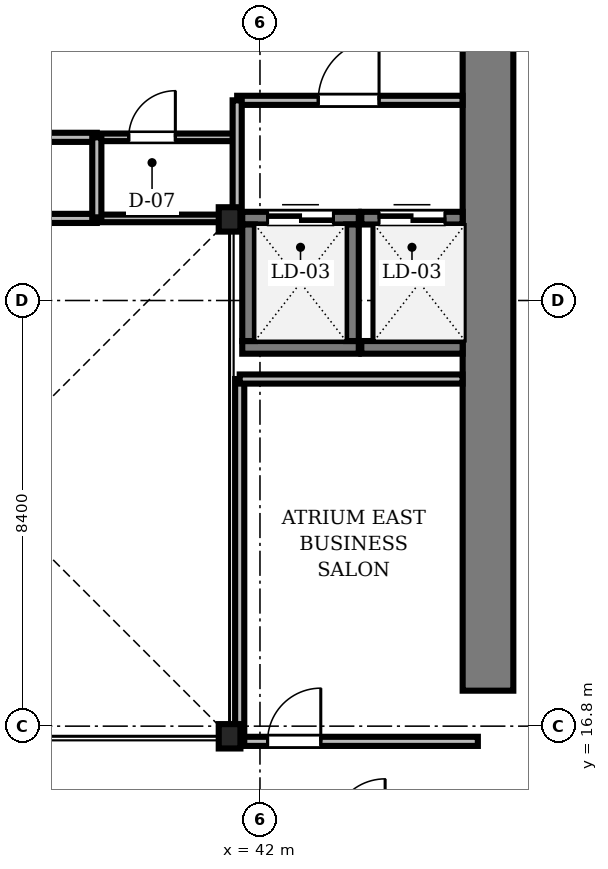
"""IFC4 building model, lengths in metres.
Left out: names, types, materials, properties, quantities, classifications, styles, units other than length and angle.
Written with IfcOpenShell. Run it as: python <this file> out.ifc"""

import sys

from ifc_helpers import new_model, si_unit, direction, frame, frame_2d, origin, origin_2d, place, context, subcontext, project, spatial, rectangle, i_section, extrude, source, transform, mapped, element, fill, save


model = new_model("IFC4")
c1 = context("Model", 3, precision=1e-05, world=origin(), true_north=direction((0.0, 1.0)))
c2 = subcontext(c1, "Body", "Model", "MODEL_VIEW")
j1 = project(units=[si_unit("LENGTHUNIT", "METRE"), si_unit("PLANEANGLEUNIT", "RADIAN")], contexts=[c1])
p1 = place(None, origin())
s1 = spatial("IfcSite", under=j1, at=p1, CompositionType="ELEMENT")
p2 = place(p1, origin())
s2 = spatial("IfcBuilding", under=s1, at=p2, CompositionType="ELEMENT")
p3 = place(p2, frame((0.0, 0.0, 71.4)))
s3 = spatial("IfcBuildingStorey", under=s2, at=p3, CompositionType="ELEMENT", Elevation=71.4)
m1 = source(origin(), c2, "Body", "SweptSolid", [
    extrude(rectangle(XDim=13.15, YDim=1.0, at=frame_2d((6.575, 0.0))), origin(), (0.0, 0.0, 1.0), 3.41),
])
p4 = place(p3, frame((46.5, 17.5, 0.0), z_axis=(0.0, 0.0, 1.0), x_axis=(0.0, 1.0, 0.0)))
e1 = element("IfcWall", 1, at=p4, inside=s3, PredefinedType="SHEAR", context=c2, shape_type="MappedRepresentation", body=[
    mapped(m1, transform((0.0, 0.0, 0.0), scale=1.0)),
])
m2 = source(origin(), c2, "Body", "SweptSolid", [
    extrude(i_section(OverallWidth=0.428, OverallDepth=0.481, WebThickness=0.04, FlangeThickness=0.063, FilletRadius=0.015, at=origin_2d()), origin(), (0.0, 0.0, 1.0), 3.41),
])
for number, where, z_axis, x_axis in (
    (2, (41.4, 16.6, 0.0), (0.0, 0.0, 1.0), (1.0, 0.0, 0.0)),
    (3, (41.4, 26.8, 0.0), (0.0, 0.0, 1.0), (1.0, 0.0, 0.0)),
):
    element("IfcColumn", number, at=place(p3, frame(where, z_axis=z_axis, x_axis=x_axis)), inside=s3, PredefinedType="COLUMN", context=c2, shape_type="MappedRepresentation", body=[
        mapped(m2, transform((0.0, 0.0, 0.0), scale=1.0)),
    ])
m3 = source(origin(), c2, "Body", "SweptSolid", [
    extrude(rectangle(XDim=2.3, YDim=0.25, at=frame_2d((1.15, 0.0))), origin(), (0.0, 0.0, 1.0), 3.41),
])
p5 = place(p3, frame((41.65, 24.275, 0.0), z_axis=(0.0, 0.0, 1.0), x_axis=(1.0, 0.0, 0.0)))
e4 = element("IfcWall", 4, at=p5, inside=s3, PredefinedType="SOLIDWALL", context=c2, shape_type="MappedRepresentation", body=[
    mapped(m3, transform((0.0, 0.0, 0.0), scale=1.0)),
])
p6 = place(p3, frame((41.65, 26.825, 0.0), z_axis=(0.0, 0.0, 1.0), x_axis=(1.0, 0.0, 0.0)))
e5 = element("IfcWall", 5, at=p6, inside=s3, PredefinedType="SOLIDWALL", context=c2, shape_type="MappedRepresentation", body=[
    mapped(m3, transform((0.0, 0.0, 0.0), scale=1.0)),
])
m4 = source(origin(), c2, "Body", "SweptSolid", [
    extrude(rectangle(XDim=1.3, YDim=2.3, at=frame_2d((0.65, 1.15))), frame((0.0, 0.135, 0.0), z_axis=(0.0, -1.0, 0.0), x_axis=(1.0, 0.0, 0.0)), (0.0, 0.0, 1.0), 0.27),
])
p7 = place(p6, frame((0.5, 0.0, 0.0)))
e6 = element("IfcOpeningElement", 6, at=p7, cuts=e5, PredefinedType="OPENING", context=c2, shape_type="MappedRepresentation", body=[
    mapped(m4, transform((0.0, 0.0, 0.0), scale=1.0)),
])
for number, where, z_axis, x_axis in (
    (7, (41.775, 24.4, 0.0), (0.0, 0.0, 1.0), (0.0, 1.0, 0.0)),
    (8, (43.825, 24.4, 0.0), (0.0, 0.0, 1.0), (0.0, 1.0, 0.0)),
):
    element("IfcWall", number, at=place(p3, frame(where, z_axis=z_axis, x_axis=x_axis)), inside=s3, PredefinedType="SOLIDWALL", context=c2, shape_type="MappedRepresentation", body=[
        mapped(m3, transform((0.0, 0.0, 0.0), scale=1.0)),
    ])
m5 = source(origin(), c2, "Body", "SweptSolid", [
    extrude(rectangle(XDim=2.0, YDim=0.25, at=frame_2d((1.0, 0.0))), origin(), (0.0, 0.0, 1.0), 3.41),
])
p8 = place(p3, frame((44.0, 24.275, 0.0), z_axis=(0.0, 0.0, 1.0), x_axis=(1.0, 0.0, 0.0)))
e9 = element("IfcWall", 9, at=p8, inside=s3, PredefinedType="SOLIDWALL", context=c2, shape_type="MappedRepresentation", body=[
    mapped(m5, transform((0.0, 0.0, 0.0), scale=1.0)),
])
p9 = place(p3, frame((44.0, 26.825, 0.0), z_axis=(0.0, 0.0, 1.0), x_axis=(1.0, 0.0, 0.0)))
e10 = element("IfcWall", 10, at=p9, inside=s3, PredefinedType="SOLIDWALL", context=c2, shape_type="MappedRepresentation", body=[
    mapped(m5, transform((0.0, 0.0, 0.0), scale=1.0)),
])
p10 = place(p9, frame((0.35, 0.0, 0.0)))
e11 = element("IfcOpeningElement", 11, at=p10, cuts=e10, PredefinedType="OPENING", context=c2, shape_type="MappedRepresentation", body=[
    mapped(m4, transform((0.0, 0.0, 0.0), scale=1.0)),
])
m6 = source(origin(), c2, "Body", "SweptSolid", [
    extrude(rectangle(XDim=7.33, YDim=0.18, at=frame_2d((3.665, 0.0))), origin(), (0.0, 0.0, 1.0), 3.042),
])
p11 = place(p3, frame((31.45, 28.42, 0.0), z_axis=(0.0, 0.0, 1.0), x_axis=(1.0, 0.0, 0.0)))
e12 = element("IfcWall", 12, at=p11, inside=s3, PredefinedType="PARTITIONING", context=c2, shape_type="MappedRepresentation", body=[
    mapped(m6, transform((0.0, 0.0, 0.0), scale=1.0)),
])
m7 = source(origin(), c2, "Body", "SweptSolid", [
    extrude(rectangle(XDim=0.95, YDim=2.15, at=frame_2d((0.475, 1.075))), frame((0.0, 0.1, 0.0), z_axis=(0.0, -1.0, 0.0), x_axis=(1.0, 0.0, 0.0)), (0.0, 0.0, 1.0), 0.2),
])
p12 = place(p11, frame((0.65, 0.0, 0.0)))
e13 = element("IfcOpeningElement", 13, at=p12, cuts=e12, PredefinedType="OPENING", context=c2, shape_type="MappedRepresentation", body=[
    mapped(m7, transform((0.0, 0.0, 0.0), scale=1.0)),
])
m8 = source(origin(), c2, "Body", "SweptSolid", [
    extrude(rectangle(XDim=4.448, YDim=0.18, at=frame_2d((2.224, 0.0))), origin(), (0.0, 0.0, 1.0), 3.042),
])
p13 = place(p3, frame((41.55, 29.15, 0.0), z_axis=(0.0, 0.0, 1.0), x_axis=(1.0, 0.0, 0.0)))
e14 = element("IfcWall", 14, at=p13, inside=s3, PredefinedType="PARTITIONING", context=c2, shape_type="MappedRepresentation", body=[
    mapped(m8, transform((0.0, 0.0, 0.0), scale=1.0)),
])
m9 = source(origin(), c2, "Body", "SweptSolid", [
    extrude(rectangle(XDim=1.2, YDim=2.2, at=frame_2d((0.6, 1.1))), frame((0.0, 0.1, 0.0), z_axis=(0.0, -1.0, 0.0), x_axis=(1.0, 0.0, 0.0)), (0.0, 0.0, 1.0), 0.2),
])
p14 = place(p13, frame((1.6, 0.0, 0.0)))
e15 = element("IfcOpeningElement", 15, at=p14, cuts=e14, PredefinedType="OPENING", context=c2, shape_type="MappedRepresentation", body=[
    mapped(m9, transform((0.0, 0.0, 0.0), scale=1.0)),
])
m10 = source(origin(), c2, "Body", "SweptSolid", [
    extrude(rectangle(XDim=4.7, YDim=0.18, at=frame_2d((2.35, 0.0))), origin(), (0.0, 0.0, 1.0), 2.802),
])
p15 = place(p3, frame((41.6, 16.5, 0.0), z_axis=(0.0, 0.0, 1.0), x_axis=(1.0, 0.0, 0.0)))
e16 = element("IfcWall", 16, at=p15, inside=s3, PredefinedType="PARTITIONING", context=c2, shape_type="MappedRepresentation", body=[
    mapped(m10, transform((0.0, 0.0, 0.0), scale=1.0)),
])
m11 = source(origin(), c2, "Body", "SweptSolid", [
    extrude(rectangle(XDim=1.05, YDim=2.2, at=frame_2d((0.525, 1.1))), frame((0.0, 0.1, 0.0), z_axis=(0.0, -1.0, 0.0), x_axis=(1.0, 0.0, 0.0)), (0.0, 0.0, 1.0), 0.2),
])
p16 = place(p15, frame((0.55, 0.0, 0.0)))
e17 = element("IfcOpeningElement", 17, at=p16, cuts=e16, PredefinedType="OPENING", context=c2, shape_type="MappedRepresentation", body=[
    mapped(m11, transform((0.0, 0.0, 0.0), scale=1.0)),
])
m12 = source(origin(), c2, "Body", "SweptSolid", [
    extrude(rectangle(XDim=2.74, YDim=0.15, at=frame_2d((1.37, 0.0))), origin(), (0.0, 0.0, 1.0), 3.41),
])
p17 = place(p3, frame((38.78, 28.42, 0.0), z_axis=(0.0, 0.0, 1.0), x_axis=(1.0, 0.0, 0.0)))
e18 = element("IfcWall", 18, at=p17, inside=s3, PredefinedType="PARTITIONING", context=c2, shape_type="MappedRepresentation", body=[
    mapped(m12, transform((0.0, 0.0, 0.0), scale=1.0)),
])
m13 = source(origin(), c2, "Body", "SweptSolid", [
    extrude(rectangle(XDim=0.92, YDim=2.1, at=frame_2d((0.46, 1.05))), frame((0.0, 0.085, 0.0), z_axis=(0.0, -1.0, 0.0), x_axis=(1.0, 0.0, 0.0)), (0.0, 0.0, 1.0), 0.17),
])
p18 = place(p17, frame((0.63, 0.0, 0.0)))
e19 = element("IfcOpeningElement", 19, at=p18, cuts=e18, PredefinedType="OPENING", context=c2, shape_type="MappedRepresentation", body=[
    mapped(m13, transform((0.0, 0.0, 0.0), scale=1.0)),
])
m14 = source(origin(), c2, "Body", "SweptSolid", [
    extrude(rectangle(XDim=7.33, YDim=0.18, at=frame_2d((3.665, 0.0))), origin(), (0.0, 0.0, 1.0), 2.952),
])
p19 = place(p3, frame((31.45, 26.82, 0.0), z_axis=(0.0, 0.0, 1.0), x_axis=(1.0, 0.0, 0.0)))
e20 = element("IfcWall", 20, at=p19, inside=s3, PredefinedType="PARTITIONING", context=c2, shape_type="MappedRepresentation", body=[
    mapped(m14, transform((0.0, 0.0, 0.0), scale=1.0)),
])
m15 = source(origin(), c2, "Body", "SweptSolid", [
    extrude(rectangle(XDim=7.15, YDim=0.18, at=frame_2d((3.575, 0.0))), origin(), (0.0, 0.0, 1.0), 2.802),
])
p20 = place(p3, frame((41.6, 16.5, 0.0), z_axis=(0.0, 0.0, 1.0), x_axis=(0.0, 1.0, 0.0)))
e21 = element("IfcWall", 21, at=p20, inside=s3, PredefinedType="PARTITIONING", context=c2, shape_type="MappedRepresentation", body=[
    mapped(m15, transform((0.0, 0.0, 0.0), scale=1.0)),
])
m16 = source(origin(), c2, "Body", "SweptSolid", [
    extrude(rectangle(XDim=4.398, YDim=0.18, at=frame_2d((2.199, 0.0))), origin(), (0.0, 0.0, 1.0), 3.41),
])
p21 = place(p3, frame((41.6, 23.65, 0.0), z_axis=(0.0, 0.0, 1.0), x_axis=(1.0, 0.0, 0.0)))
e22 = element("IfcWall", 22, at=p21, inside=s3, PredefinedType="PARTITIONING", context=c2, shape_type="MappedRepresentation", body=[
    mapped(m16, transform((0.0, 0.0, 0.0), scale=1.0)),
])
m17 = source(origin(), c2, "Body", "SweptSolid", [
    extrude(rectangle(XDim=2.74, YDim=0.15, at=frame_2d((1.37, 0.0))), origin(), (0.0, 0.0, 1.0), 2.802),
])
p22 = place(p3, frame((38.78, 26.82, 0.0), z_axis=(0.0, 0.0, 1.0), x_axis=(1.0, 0.0, 0.0)))
e23 = element("IfcWall", 23, at=p22, inside=s3, PredefinedType="PARTITIONING", context=c2, shape_type="MappedRepresentation", body=[
    mapped(m17, transform((0.0, 0.0, 0.0), scale=1.0)),
])
m18 = source(origin(), c2, "Body", "SweptSolid", [
    extrude(rectangle(XDim=2.35, YDim=0.18, at=frame_2d((1.175, 0.0))), origin(), (0.0, 0.0, 1.0), 2.802),
])
p23 = place(p3, frame((41.55, 26.8, 0.0), z_axis=(0.0, 0.0, 1.0), x_axis=(0.0, 1.0, 0.0)))
e24 = element("IfcWall", 24, at=p23, inside=s3, PredefinedType="PARTITIONING", context=c2, shape_type="MappedRepresentation", body=[
    mapped(m18, transform((0.0, 0.0, 0.0), scale=1.0)),
])
m19 = source(origin(), c2, "Body", "SweptSolid", [
    extrude(rectangle(XDim=1.6, YDim=0.18, at=frame_2d((0.8, 0.0))), origin(), (0.0, 0.0, 1.0), 2.952),
])
p24 = place(p3, frame((38.78, 26.82, 0.0), z_axis=(0.0, 0.0, 1.0), x_axis=(0.0, 1.0, 0.0)))
e25 = element("IfcWall", 25, at=p24, inside=s3, PredefinedType="PARTITIONING", context=c2, shape_type="MappedRepresentation", body=[
    mapped(m19, transform((0.0, 0.0, 0.0), scale=1.0)),
])
m20 = source(origin(), c2, "Body", "SweptSolid", [
    extrude(rectangle(XDim=1.3, YDim=2.3, at=frame_2d((0.65, 1.15))), frame((0.0, 0.025, 0.0), z_axis=(0.0, -1.0, 0.0), x_axis=(1.0, 0.0, 0.0)), (0.0, 0.0, 1.0), 0.05),
])
p25 = place(p7, origin())
e26 = element("IfcDoor", 26, at=p25, inside=s3, OperationType="DOUBLE_DOOR_SLIDING", PredefinedType="DOOR", context=c2, shape_type="MappedRepresentation", body=[
    mapped(m20, transform((0.0, 0.0, 0.0), scale=1.0)),
])
fill(e6, e26)
p26 = place(p10, origin())
e27 = element("IfcDoor", 27, at=p26, inside=s3, OperationType="DOUBLE_DOOR_SLIDING", PredefinedType="DOOR", context=c2, shape_type="MappedRepresentation", body=[
    mapped(m20, transform((0.0, 0.0, 0.0), scale=1.0)),
])
fill(e11, e27)
m21 = source(origin(), c2, "Body", "SweptSolid", [
    extrude(rectangle(XDim=1.2, YDim=2.2, at=frame_2d((0.6, 1.1))), frame((0.0, 0.025, 0.0), z_axis=(0.0, -1.0, 0.0), x_axis=(1.0, 0.0, 0.0)), (0.0, 0.0, 1.0), 0.05),
])
p27 = place(p14, origin())
e28 = element("IfcDoor", 28, at=p27, inside=s3, OperationType="SINGLE_SWING_RIGHT", PredefinedType="DOOR", context=c2, shape_type="MappedRepresentation", body=[
    mapped(m21, transform((0.0, 0.0, 0.0), scale=1.0)),
])
fill(e15, e28)
m22 = source(origin(), c2, "Body", "SweptSolid", [
    extrude(rectangle(XDim=1.05, YDim=2.2, at=frame_2d((0.525, 1.1))), frame((0.0, 0.025, 0.0), z_axis=(0.0, -1.0, 0.0), x_axis=(1.0, 0.0, 0.0)), (0.0, 0.0, 1.0), 0.05),
])
p28 = place(p16, origin())
e29 = element("IfcDoor", 29, at=p28, inside=s3, OperationType="SINGLE_SWING_RIGHT", PredefinedType="DOOR", context=c2, shape_type="MappedRepresentation", body=[
    mapped(m22, transform((0.0, 0.0, 0.0), scale=1.0)),
])
fill(e17, e29)
m23 = source(origin(), c2, "Body", "SweptSolid", [
    extrude(rectangle(XDim=0.92, YDim=2.1, at=frame_2d((0.46, 1.05))), frame((0.0, 0.025, 0.0), z_axis=(0.0, -1.0, 0.0), x_axis=(1.0, 0.0, 0.0)), (0.0, 0.0, 1.0), 0.05),
])
p29 = place(p18, origin())
e30 = element("IfcDoor", 30, at=p29, inside=s3, OperationType="SINGLE_SWING_RIGHT", PredefinedType="DOOR", context=c2, shape_type="MappedRepresentation", body=[
    mapped(m23, transform((0.0, 0.0, 0.0), scale=1.0)),
])
fill(e19, e30)
save(model, sys.argv[1])
